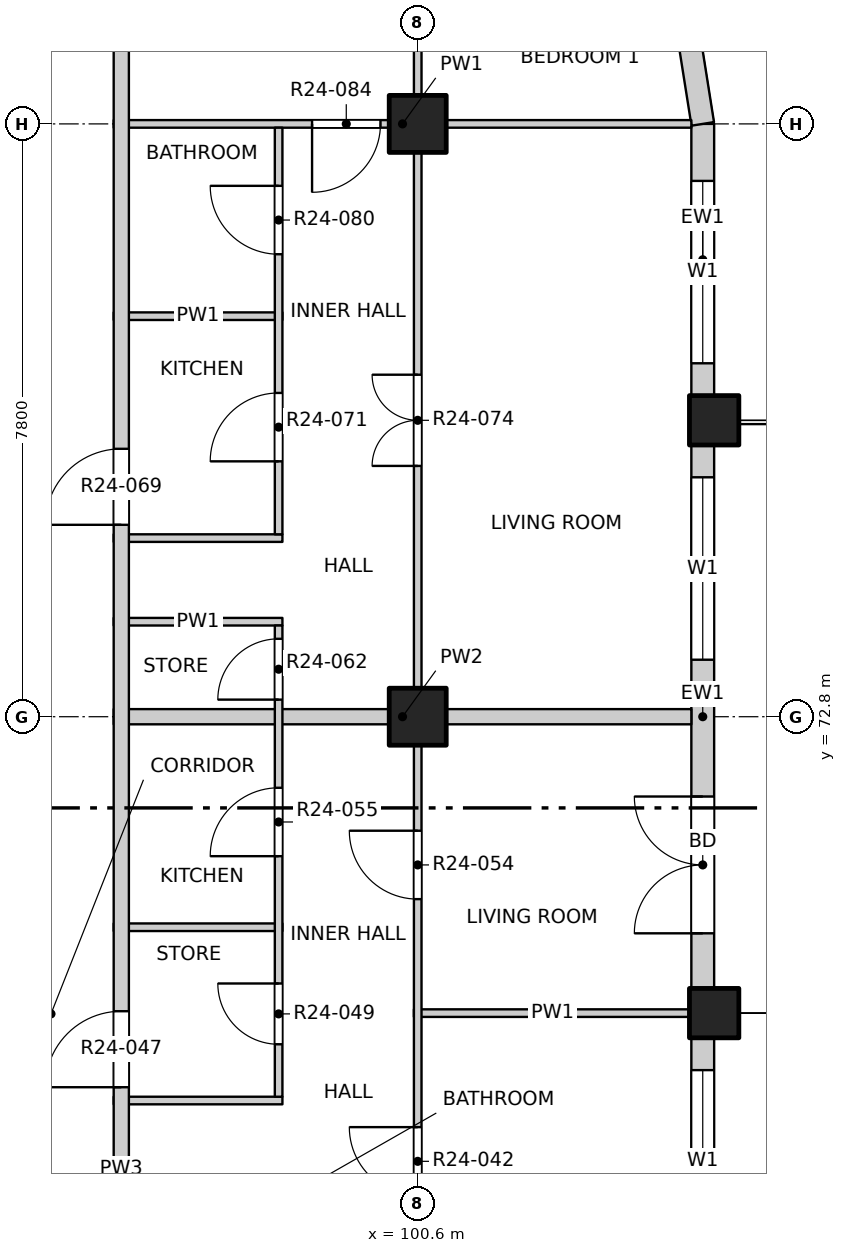
"""IFC4 building model, lengths in metres.
Left out: names, types, materials, properties, quantities, classifications, styles, units other than length and angle.
Written with IfcOpenShell. Run it as: python <this file> out.ifc"""

import sys

from ifc_helpers import new_model, si_unit, direction, frame, frame_2d, origin, origin_2d, place, context, subcontext, project, spatial, rectangle, extrude, element, fill, save


model = new_model("IFC4")
c1 = context("Model", 3, precision=1e-05, world=origin(), true_north=direction((0.0, 1.0)))
c2 = subcontext(c1, "Body", "Model", "MODEL_VIEW")
j1 = project(units=[si_unit("LENGTHUNIT", "METRE"), si_unit("PLANEANGLEUNIT", "RADIAN")], contexts=[c1])
p1 = place(None, origin())
s1 = spatial("IfcSite", under=j1, at=p1, CompositionType="ELEMENT")
p2 = place(p1, origin())
s2 = spatial("IfcBuilding", under=s1, at=p2, CompositionType="ELEMENT")
p3 = place(p2, frame((0.0, 0.0, 246.0)))
s3 = spatial("IfcBuildingStorey", under=s2, at=p3, CompositionType="ELEMENT", Elevation=246.0)
for number, where, z_axis, x_axis in (
    (1, (104.5, 68.9, -0.3), (0.0, 0.0, 1.0), (1.0, 0.0, 0.0)),
    (2, (104.5, 76.7, -0.3), (0.0, 0.0, 1.0), (1.0, 0.0, 0.0)),
):
    element("IfcColumn", number, at=place(p3, frame(where, z_axis=z_axis, x_axis=x_axis)), inside=s3, PredefinedType="COLUMN", context=c2, shape_type="SweptSolid", body=[
        extrude(rectangle(XDim=0.65, YDim=0.65, at=origin_2d()), origin(), (0.0, 0.0, 1.0), 3.45),
    ])
for number, where, z_axis, x_axis in (
    (3, (100.6, 72.8, -0.3), (0.0, 0.0, 1.0), (1.0, 0.0, 0.0)),
    (4, (100.6, 80.6, -0.3), (0.0, 0.0, 1.0), (1.0, 0.0, 0.0)),
):
    element("IfcColumn", number, at=place(p3, frame(where, z_axis=z_axis, x_axis=x_axis)), inside=s3, PredefinedType="COLUMN", context=c2, shape_type="SweptSolid", body=[
        extrude(rectangle(XDim=0.75, YDim=0.75, at=origin_2d()), origin(), (0.0, 0.0, 1.0), 3.45),
    ])
p4 = place(p3, frame((104.35, 61.425, 0.0), z_axis=(0.0, 0.0, 1.0), x_axis=(0.0, 1.0, 0.0)))
e5 = element("IfcWall", 5, at=p4, inside=s3, PredefinedType="SOLIDWALL", context=c2, shape_type="SweptSolid", body=[
    extrude(rectangle(XDim=7.15, YDim=0.3, at=frame_2d((3.575, 0.0))), origin(), (0.0, 0.0, 1.0), 2.7),
])
p5 = place(p4, frame((0.725, 0.0, 0.0)))
e6 = element("IfcOpeningElement", 6, at=p5, cuts=e5, PredefinedType="OPENING", context=c2, shape_type="SweptSolid", body=[
    extrude(rectangle(XDim=1.8, YDim=2.4, at=frame_2d((0.9, 1.2))), frame((0.0, 0.16, 0.0), z_axis=(0.0, -1.0, 0.0), x_axis=(1.0, 0.0, 0.0)), (0.0, 0.0, 1.0), 0.32),
])
p6 = place(p4, frame((4.325, 0.0, 0.9)))
e7 = element("IfcOpeningElement", 7, at=p6, cuts=e5, PredefinedType="OPENING", context=c2, shape_type="SweptSolid", body=[
    extrude(rectangle(XDim=2.4, YDim=1.8, at=frame_2d((1.2, 0.9))), frame((0.0, 0.16, 0.0), z_axis=(0.0, -1.0, 0.0), x_axis=(1.0, 0.0, 0.0)), (0.0, 0.0, 1.0), 0.32),
])
p7 = place(p3, frame((104.35, 69.225, 0.0), z_axis=(0.0, 0.0, 1.0), x_axis=(0.0, 1.0, 0.0)))
e8 = element("IfcWall", 8, at=p7, inside=s3, PredefinedType="SOLIDWALL", context=c2, shape_type="SweptSolid", body=[
    extrude(rectangle(XDim=7.15, YDim=0.3, at=frame_2d((3.575, 0.0))), origin(), (0.0, 0.0, 1.0), 2.7),
])
p8 = place(p7, frame((0.725, 0.0, 0.0)))
e9 = element("IfcOpeningElement", 9, at=p8, cuts=e8, PredefinedType="OPENING", context=c2, shape_type="SweptSolid", body=[
    extrude(rectangle(XDim=1.8, YDim=2.4, at=frame_2d((0.9, 1.2))), frame((0.0, 0.16, 0.0), z_axis=(0.0, -1.0, 0.0), x_axis=(1.0, 0.0, 0.0)), (0.0, 0.0, 1.0), 0.32),
])
p9 = place(p7, frame((4.325, 0.0, 0.9)))
e10 = element("IfcOpeningElement", 10, at=p9, cuts=e8, PredefinedType="OPENING", context=c2, shape_type="SweptSolid", body=[
    extrude(rectangle(XDim=2.4, YDim=1.8, at=frame_2d((1.2, 0.9))), frame((0.0, 0.16, 0.0), z_axis=(0.0, -1.0, 0.0), x_axis=(1.0, 0.0, 0.0)), (0.0, 0.0, 1.0), 0.32),
])
p10 = place(p3, frame((104.35, 77.025, 0.0), z_axis=(0.0, 0.0, 1.0), x_axis=(0.0, 1.0, 0.0)))
e11 = element("IfcWall", 11, at=p10, inside=s3, PredefinedType="SOLIDWALL", context=c2, shape_type="SweptSolid", body=[
    extrude(rectangle(XDim=3.575, YDim=0.3, at=frame_2d((1.788, 0.0))), origin(), (0.0, 0.0, 1.0), 2.7),
])
p11 = place(p10, frame((0.425, 0.0, 0.9)))
e12 = element("IfcOpeningElement", 12, at=p11, cuts=e11, PredefinedType="OPENING", context=c2, shape_type="SweptSolid", body=[
    extrude(rectangle(XDim=2.4, YDim=1.8, at=frame_2d((1.2, 0.9))), frame((0.0, 0.16, 0.0), z_axis=(0.0, -1.0, 0.0), x_axis=(1.0, 0.0, 0.0)), (0.0, 0.0, 1.0), 0.32),
])
p12 = place(p3, frame((104.35, 80.6, 0.0), z_axis=(0.0, 0.0, 1.0), x_axis=(-0.156496880861, 0.987678452879, 0.0)))
e13 = element("IfcWall", 13, at=p12, inside=s3, PredefinedType="SOLIDWALL", context=c2, shape_type="SweptSolid", body=[
    extrude(rectangle(XDim=1.173, YDim=0.3, at=frame_2d((0.586, 0.0))), origin(), (0.0, 0.0, 1.0), 2.7),
])
p13 = place(p3, frame((96.6, 67.75, 0.0), z_axis=(0.0, 0.0, 1.0), x_axis=(1.0, 0.0, 0.0)))
e14 = element("IfcWall", 14, at=p13, inside=s3, PredefinedType="PARTITIONING", context=c2, shape_type="SweptSolid", body=[
    extrude(rectangle(XDim=2.22, YDim=0.1, at=frame_2d((1.11, 0.0))), origin(), (0.0, 0.0, 1.0), 3.15),
])
p14 = place(p3, frame((100.55, 68.9, 0.0), z_axis=(0.0, 0.0, 1.0), x_axis=(1.0, 0.0, 0.0)))
e15 = element("IfcWall", 15, at=p14, inside=s3, PredefinedType="PARTITIONING", context=c2, shape_type="SweptSolid", body=[
    extrude(rectangle(XDim=3.65, YDim=0.1, at=frame_2d((1.825, 0.0))), origin(), (0.0, 0.0, 1.0), 2.55),
])
p15 = place(p3, frame((96.6, 70.03, 0.0), z_axis=(0.0, 0.0, 1.0), x_axis=(1.0, 0.0, 0.0)))
e16 = element("IfcWall", 16, at=p15, inside=s3, PredefinedType="PARTITIONING", context=c2, shape_type="SweptSolid", body=[
    extrude(rectangle(XDim=2.22, YDim=0.1, at=frame_2d((1.11, 0.0))), origin(), (0.0, 0.0, 1.0), 3.15),
])
p16 = place(p3, frame((96.6, 72.8, 0.0), z_axis=(0.0, 0.0, 1.0), x_axis=(1.0, 0.0, 0.0)))
e17 = element("IfcWall", 17, at=p16, inside=s3, PredefinedType="PARTITIONING", context=c2, shape_type="SweptSolid", body=[
    extrude(rectangle(XDim=7.6, YDim=0.2, at=frame_2d((3.8, 0.0))), origin(), (0.0, 0.0, 1.0), 3.15),
])
for number, where, z_axis, x_axis in (
    (18, (96.6, 74.05, 0.0), (0.0, 0.0, 1.0), (1.0, 0.0, 0.0)),
    (19, (96.6, 75.15, 0.0), (0.0, 0.0, 1.0), (1.0, 0.0, 0.0)),
    (20, (96.6, 78.07, 0.0), (0.0, 0.0, 1.0), (1.0, 0.0, 0.0)),
):
    element("IfcWall", number, at=place(p3, frame(where, z_axis=z_axis, x_axis=x_axis)), inside=s3, PredefinedType="PARTITIONING", context=c2, shape_type="SweptSolid", body=[
        extrude(rectangle(XDim=2.22, YDim=0.1, at=frame_2d((1.11, 0.0))), origin(), (0.0, 0.0, 1.0), 3.15),
    ])
p17 = place(p3, frame((96.6, 80.6, 0.0), z_axis=(0.0, 0.0, 1.0), x_axis=(1.0, 0.0, 0.0)))
e21 = element("IfcWall", 21, at=p17, inside=s3, PredefinedType="PARTITIONING", context=c2, shape_type="SweptSolid", body=[
    extrude(rectangle(XDim=7.6, YDim=0.1, at=frame_2d((3.8, 0.0))), origin(), (0.0, 0.0, 1.0), 3.15),
])
p18 = place(p17, frame((2.61, 0.0, 0.0)))
e22 = element("IfcOpeningElement", 22, at=p18, cuts=e21, PredefinedType="OPENING", context=c2, shape_type="SweptSolid", body=[
    extrude(rectangle(XDim=0.9, YDim=2.1, at=frame_2d((0.45, 1.05))), frame((0.0, 0.06, 0.0), z_axis=(0.0, -1.0, 0.0), x_axis=(1.0, 0.0, 0.0)), (0.0, 0.0, 1.0), 0.12),
])
p19 = place(p3, frame((96.7, 49.5, 0.0), z_axis=(0.0, 0.0, 1.0), x_axis=(0.0, 1.0, 0.0)))
e23 = element("IfcWall", 23, at=p19, inside=s3, PredefinedType="PARTITIONING", context=c2, shape_type="SweptSolid", body=[
    extrude(rectangle(XDim=34.7, YDim=0.2, at=frame_2d((17.35, 0.0))), origin(), (0.0, 0.0, 1.0), 3.15),
])
p20 = place(p19, frame((3.075, 0.0, 0.0)))
e24 = element("IfcOpeningElement", 24, at=p20, cuts=e23, PredefinedType="OPENING", context=c2, shape_type="SweptSolid", body=[
    extrude(rectangle(XDim=1.0, YDim=2.1, at=frame_2d((0.5, 1.05))), frame((0.0, 0.11, 0.0), z_axis=(0.0, -1.0, 0.0), x_axis=(1.0, 0.0, 0.0)), (0.0, 0.0, 1.0), 0.22),
])
p21 = place(p19, frame((18.425, 0.0, 0.0)))
e25 = element("IfcOpeningElement", 25, at=p21, cuts=e23, PredefinedType="OPENING", context=c2, shape_type="SweptSolid", body=[
    extrude(rectangle(XDim=1.0, YDim=2.1, at=frame_2d((0.5, 1.05))), frame((0.0, 0.11, 0.0), z_axis=(0.0, -1.0, 0.0), x_axis=(1.0, 0.0, 0.0)), (0.0, 0.0, 1.0), 0.22),
])
p22 = place(p19, frame((25.825, 0.0, 0.0)))
e26 = element("IfcOpeningElement", 26, at=p22, cuts=e23, PredefinedType="OPENING", context=c2, shape_type="SweptSolid", body=[
    extrude(rectangle(XDim=1.0, YDim=2.1, at=frame_2d((0.5, 1.05))), frame((0.0, 0.11, 0.0), z_axis=(0.0, -1.0, 0.0), x_axis=(1.0, 0.0, 0.0)), (0.0, 0.0, 1.0), 0.22),
])
p23 = place(p3, frame((98.77, 67.8, 0.0), z_axis=(0.0, 0.0, 1.0), x_axis=(0.0, 1.0, 0.0)))
e27 = element("IfcWall", 27, at=p23, inside=s3, PredefinedType="PARTITIONING", context=c2, shape_type="SweptSolid", body=[
    extrude(rectangle(XDim=6.2, YDim=0.1, at=frame_2d((3.1, 0.0))), origin(), (0.0, 0.0, 1.0), 3.15),
])
p24 = place(p23, frame((0.69, 0.0, 0.0)))
e28 = element("IfcOpeningElement", 28, at=p24, cuts=e27, PredefinedType="OPENING", context=c2, shape_type="SweptSolid", body=[
    extrude(rectangle(XDim=0.8, YDim=2.1, at=frame_2d((0.4, 1.05))), frame((0.0, 0.06, 0.0), z_axis=(0.0, -1.0, 0.0), x_axis=(1.0, 0.0, 0.0)), (0.0, 0.0, 1.0), 0.12),
])
p25 = place(p23, frame((3.165, 0.0, 0.0)))
e29 = element("IfcOpeningElement", 29, at=p25, cuts=e27, PredefinedType="OPENING", context=c2, shape_type="SweptSolid", body=[
    extrude(rectangle(XDim=0.9, YDim=2.1, at=frame_2d((0.45, 1.05))), frame((0.0, 0.06, 0.0), z_axis=(0.0, -1.0, 0.0), x_axis=(1.0, 0.0, 0.0)), (0.0, 0.0, 1.0), 0.12),
])
p26 = place(p23, frame((5.225, 0.0, 0.0)))
e30 = element("IfcOpeningElement", 30, at=p26, cuts=e27, PredefinedType="OPENING", context=c2, shape_type="SweptSolid", body=[
    extrude(rectangle(XDim=0.8, YDim=2.1, at=frame_2d((0.4, 1.05))), frame((0.0, 0.06, 0.0), z_axis=(0.0, -1.0, 0.0), x_axis=(1.0, 0.0, 0.0)), (0.0, 0.0, 1.0), 0.12),
])
p27 = place(p3, frame((98.77, 75.2, 0.0), z_axis=(0.0, 0.0, 1.0), x_axis=(0.0, 1.0, 0.0)))
e31 = element("IfcWall", 31, at=p27, inside=s3, PredefinedType="PARTITIONING", context=c2, shape_type="SweptSolid", body=[
    extrude(rectangle(XDim=5.35, YDim=0.1, at=frame_2d((2.675, 0.0))), origin(), (0.0, 0.0, 1.0), 3.15),
])
p28 = place(p27, frame((0.96, 0.0, 0.0)))
e32 = element("IfcOpeningElement", 32, at=p28, cuts=e31, PredefinedType="OPENING", context=c2, shape_type="SweptSolid", body=[
    extrude(rectangle(XDim=0.9, YDim=2.1, at=frame_2d((0.45, 1.05))), frame((0.0, 0.06, 0.0), z_axis=(0.0, -1.0, 0.0), x_axis=(1.0, 0.0, 0.0)), (0.0, 0.0, 1.0), 0.12),
])
p29 = place(p27, frame((3.685, 0.0, 0.0)))
e33 = element("IfcOpeningElement", 33, at=p29, cuts=e31, PredefinedType="OPENING", context=c2, shape_type="SweptSolid", body=[
    extrude(rectangle(XDim=0.9, YDim=2.1, at=frame_2d((0.45, 1.05))), frame((0.0, 0.06, 0.0), z_axis=(0.0, -1.0, 0.0), x_axis=(1.0, 0.0, 0.0)), (0.0, 0.0, 1.0), 0.12),
])
p30 = place(p3, frame((100.6, 45.8, 0.0), z_axis=(0.0, 0.0, 1.0), x_axis=(0.0, 1.0, 0.0)))
e34 = element("IfcWall", 34, at=p30, inside=s3, PredefinedType="PARTITIONING", context=c2, shape_type="SweptSolid", body=[
    extrude(rectangle(XDim=38.4, YDim=0.1, at=frame_2d((19.2, 0.0))), origin(), (0.0, 0.0, 1.0), 3.15),
])
p31 = place(p30, frame((1.05, 0.0, 0.0)))
e35 = element("IfcOpeningElement", 35, at=p31, cuts=e34, PredefinedType="OPENING", context=c2, shape_type="SweptSolid", body=[
    extrude(rectangle(XDim=1.2, YDim=2.1, at=frame_2d((0.6, 1.05))), frame((0.0, 0.06, 0.0), z_axis=(0.0, -1.0, 0.0), x_axis=(1.0, 0.0, 0.0)), (0.0, 0.0, 1.0), 0.12),
])
p32 = place(p30, frame((6.9, 0.0, 0.0)))
e36 = element("IfcOpeningElement", 36, at=p32, cuts=e34, PredefinedType="OPENING", context=c2, shape_type="SweptSolid", body=[
    extrude(rectangle(XDim=1.2, YDim=2.1, at=frame_2d((0.6, 1.05))), frame((0.0, 0.06, 0.0), z_axis=(0.0, -1.0, 0.0), x_axis=(1.0, 0.0, 0.0)), (0.0, 0.0, 1.0), 0.12),
])
p33 = place(p30, frame((12.9, 0.0, 0.0)))
e37 = element("IfcOpeningElement", 37, at=p33, cuts=e34, PredefinedType="OPENING", context=c2, shape_type="SweptSolid", body=[
    extrude(rectangle(XDim=0.9, YDim=2.1, at=frame_2d((0.45, 1.05))), frame((0.0, 0.06, 0.0), z_axis=(0.0, -1.0, 0.0), x_axis=(1.0, 0.0, 0.0)), (0.0, 0.0, 1.0), 0.12),
])
p34 = place(p30, frame((16.8, 0.0, 0.0)))
e38 = element("IfcOpeningElement", 38, at=p34, cuts=e34, PredefinedType="OPENING", context=c2, shape_type="SweptSolid", body=[
    extrude(rectangle(XDim=0.9, YDim=2.1, at=frame_2d((0.45, 1.05))), frame((0.0, 0.06, 0.0), z_axis=(0.0, -1.0, 0.0), x_axis=(1.0, 0.0, 0.0)), (0.0, 0.0, 1.0), 0.12),
])
p35 = place(p30, frame((20.7, 0.0, 0.0)))
e39 = element("IfcOpeningElement", 39, at=p35, cuts=e34, PredefinedType="OPENING", context=c2, shape_type="SweptSolid", body=[
    extrude(rectangle(XDim=0.9, YDim=2.1, at=frame_2d((0.45, 1.05))), frame((0.0, 0.06, 0.0), z_axis=(0.0, -1.0, 0.0), x_axis=(1.0, 0.0, 0.0)), (0.0, 0.0, 1.0), 0.12),
])
p36 = place(p30, frame((24.6, 0.0, 0.0)))
e40 = element("IfcOpeningElement", 40, at=p36, cuts=e34, PredefinedType="OPENING", context=c2, shape_type="SweptSolid", body=[
    extrude(rectangle(XDim=0.9, YDim=2.1, at=frame_2d((0.45, 1.05))), frame((0.0, 0.06, 0.0), z_axis=(0.0, -1.0, 0.0), x_axis=(1.0, 0.0, 0.0)), (0.0, 0.0, 1.0), 0.12),
])
p37 = place(p30, frame((30.3, 0.0, 0.0)))
e41 = element("IfcOpeningElement", 41, at=p37, cuts=e34, PredefinedType="OPENING", context=c2, shape_type="SweptSolid", body=[
    extrude(rectangle(XDim=1.2, YDim=2.1, at=frame_2d((0.6, 1.05))), frame((0.0, 0.06, 0.0), z_axis=(0.0, -1.0, 0.0), x_axis=(1.0, 0.0, 0.0)), (0.0, 0.0, 1.0), 0.12),
])
p38 = place(p30, frame((36.15, 0.0, 0.0)))
e42 = element("IfcOpeningElement", 42, at=p38, cuts=e34, PredefinedType="OPENING", context=c2, shape_type="SweptSolid", body=[
    extrude(rectangle(XDim=1.2, YDim=2.1, at=frame_2d((0.6, 1.05))), frame((0.0, 0.06, 0.0), z_axis=(0.0, -1.0, 0.0), x_axis=(1.0, 0.0, 0.0)), (0.0, 0.0, 1.0), 0.12),
])
p39 = place(p6, origin())
e43 = element("IfcWindow", 43, at=p39, inside=s3, PartitioningType="DOUBLE_PANEL_VERTICAL", PredefinedType="WINDOW", context=c2, shape_type="SweptSolid", body=[
    extrude(rectangle(XDim=2.4, YDim=1.8, at=frame_2d((1.2, 0.9))), frame((0.0, 0.03, 0.0), z_axis=(0.0, -1.0, 0.0), x_axis=(1.0, 0.0, 0.0)), (0.0, 0.0, 1.0), 0.06),
])
fill(e7, e43)
p40 = place(p8, origin())
e44 = element("IfcDoor", 44, at=p40, inside=s3, OperationType="DOUBLE_DOOR_SINGLE_SWING", PredefinedType="DOOR", context=c2, shape_type="SweptSolid", body=[
    extrude(rectangle(XDim=1.8, YDim=2.4, at=frame_2d((0.9, 1.2))), frame((0.0, 0.025, 0.0), z_axis=(0.0, -1.0, 0.0), x_axis=(1.0, 0.0, 0.0)), (0.0, 0.0, 1.0), 0.05),
])
fill(e9, e44)
p41 = place(p9, origin())
e45 = element("IfcWindow", 45, at=p41, inside=s3, PartitioningType="DOUBLE_PANEL_VERTICAL", PredefinedType="WINDOW", context=c2, shape_type="SweptSolid", body=[
    extrude(rectangle(XDim=2.4, YDim=1.8, at=frame_2d((1.2, 0.9))), frame((0.0, 0.03, 0.0), z_axis=(0.0, -1.0, 0.0), x_axis=(1.0, 0.0, 0.0)), (0.0, 0.0, 1.0), 0.06),
])
fill(e10, e45)
p42 = place(p11, origin())
e46 = element("IfcWindow", 46, at=p42, inside=s3, PartitioningType="DOUBLE_PANEL_VERTICAL", PredefinedType="WINDOW", context=c2, shape_type="SweptSolid", body=[
    extrude(rectangle(XDim=2.4, YDim=1.8, at=frame_2d((1.2, 0.9))), frame((0.0, 0.03, 0.0), z_axis=(0.0, -1.0, 0.0), x_axis=(1.0, 0.0, 0.0)), (0.0, 0.0, 1.0), 0.06),
])
fill(e12, e46)
p43 = place(p35, origin())
e47 = element("IfcDoor", 47, at=p43, inside=s3, OperationType="SINGLE_SWING_RIGHT", PredefinedType="DOOR", context=c2, shape_type="SweptSolid", body=[
    extrude(rectangle(XDim=0.9, YDim=2.1, at=frame_2d((0.45, 1.05))), frame((0.0, 0.025, 0.0), z_axis=(0.0, -1.0, 0.0), x_axis=(1.0, 0.0, 0.0)), (0.0, 0.0, 1.0), 0.05),
])
fill(e39, e47)
p44 = place(p21, origin())
e48 = element("IfcDoor", 48, at=p44, inside=s3, OperationType="SINGLE_SWING_LEFT", PredefinedType="DOOR", context=c2, shape_type="SweptSolid", body=[
    extrude(rectangle(XDim=1.0, YDim=2.1, at=frame_2d((0.5, 1.05))), frame((0.0, 0.025, 0.0), z_axis=(0.0, -1.0, 0.0), x_axis=(1.0, 0.0, 0.0)), (0.0, 0.0, 1.0), 0.05),
])
fill(e25, e48)
p45 = place(p24, origin())
e49 = element("IfcDoor", 49, at=p45, inside=s3, OperationType="SINGLE_SWING_RIGHT", PredefinedType="DOOR", context=c2, shape_type="SweptSolid", body=[
    extrude(rectangle(XDim=0.8, YDim=2.1, at=frame_2d((0.4, 1.05))), frame((0.0, 0.025, 0.0), z_axis=(0.0, -1.0, 0.0), x_axis=(1.0, 0.0, 0.0)), (0.0, 0.0, 1.0), 0.05),
])
fill(e28, e49)
p46 = place(p36, origin())
e50 = element("IfcDoor", 50, at=p46, inside=s3, OperationType="SINGLE_SWING_RIGHT", PredefinedType="DOOR", context=c2, shape_type="SweptSolid", body=[
    extrude(rectangle(XDim=0.9, YDim=2.1, at=frame_2d((0.45, 1.05))), frame((0.0, 0.025, 0.0), z_axis=(0.0, -1.0, 0.0), x_axis=(1.0, 0.0, 0.0)), (0.0, 0.0, 1.0), 0.05),
])
fill(e40, e50)
p47 = place(p25, origin())
e51 = element("IfcDoor", 51, at=p47, inside=s3, OperationType="SINGLE_SWING_LEFT", PredefinedType="DOOR", context=c2, shape_type="SweptSolid", body=[
    extrude(rectangle(XDim=0.9, YDim=2.1, at=frame_2d((0.45, 1.05))), frame((0.0, 0.025, 0.0), z_axis=(0.0, -1.0, 0.0), x_axis=(1.0, 0.0, 0.0)), (0.0, 0.0, 1.0), 0.05),
])
fill(e29, e51)
p48 = place(p26, origin())
e52 = element("IfcDoor", 52, at=p48, inside=s3, OperationType="SINGLE_SWING_LEFT", PredefinedType="DOOR", context=c2, shape_type="SweptSolid", body=[
    extrude(rectangle(XDim=0.8, YDim=2.1, at=frame_2d((0.4, 1.05))), frame((0.0, 0.025, 0.0), z_axis=(0.0, -1.0, 0.0), x_axis=(1.0, 0.0, 0.0)), (0.0, 0.0, 1.0), 0.05),
])
fill(e30, e52)
p49 = place(p22, origin())
e53 = element("IfcDoor", 53, at=p49, inside=s3, OperationType="SINGLE_SWING_LEFT", PredefinedType="DOOR", context=c2, shape_type="SweptSolid", body=[
    extrude(rectangle(XDim=1.0, YDim=2.1, at=frame_2d((0.5, 1.05))), frame((0.0, 0.025, 0.0), z_axis=(0.0, -1.0, 0.0), x_axis=(1.0, 0.0, 0.0)), (0.0, 0.0, 1.0), 0.05),
])
fill(e26, e53)
p50 = place(p28, origin())
e54 = element("IfcDoor", 54, at=p50, inside=s3, OperationType="SINGLE_SWING_LEFT", PredefinedType="DOOR", context=c2, shape_type="SweptSolid", body=[
    extrude(rectangle(XDim=0.9, YDim=2.1, at=frame_2d((0.45, 1.05))), frame((0.0, 0.025, 0.0), z_axis=(0.0, -1.0, 0.0), x_axis=(1.0, 0.0, 0.0)), (0.0, 0.0, 1.0), 0.05),
])
fill(e32, e54)
p51 = place(p37, origin())
e55 = element("IfcDoor", 55, at=p51, inside=s3, OperationType="DOUBLE_DOOR_SINGLE_SWING", PredefinedType="DOOR", context=c2, shape_type="SweptSolid", body=[
    extrude(rectangle(XDim=1.2, YDim=2.1, at=frame_2d((0.6, 1.05))), frame((0.0, 0.025, 0.0), z_axis=(0.0, -1.0, 0.0), x_axis=(1.0, 0.0, 0.0)), (0.0, 0.0, 1.0), 0.05),
])
fill(e41, e55)
p52 = place(p29, origin())
e56 = element("IfcDoor", 56, at=p52, inside=s3, OperationType="SINGLE_SWING_RIGHT", PredefinedType="DOOR", context=c2, shape_type="SweptSolid", body=[
    extrude(rectangle(XDim=0.9, YDim=2.1, at=frame_2d((0.45, 1.05))), frame((0.0, 0.025, 0.0), z_axis=(0.0, -1.0, 0.0), x_axis=(1.0, 0.0, 0.0)), (0.0, 0.0, 1.0), 0.05),
])
fill(e33, e56)
p53 = place(p18, origin())
e57 = element("IfcDoor", 57, at=p53, inside=s3, OperationType="SINGLE_SWING_RIGHT", PredefinedType="DOOR", context=c2, shape_type="SweptSolid", body=[
    extrude(rectangle(XDim=0.9, YDim=2.1, at=frame_2d((0.45, 1.05))), frame((0.0, 0.025, 0.0), z_axis=(0.0, -1.0, 0.0), x_axis=(1.0, 0.0, 0.0)), (0.0, 0.0, 1.0), 0.05),
])
fill(e22, e57)
save(model, sys.argv[1])
